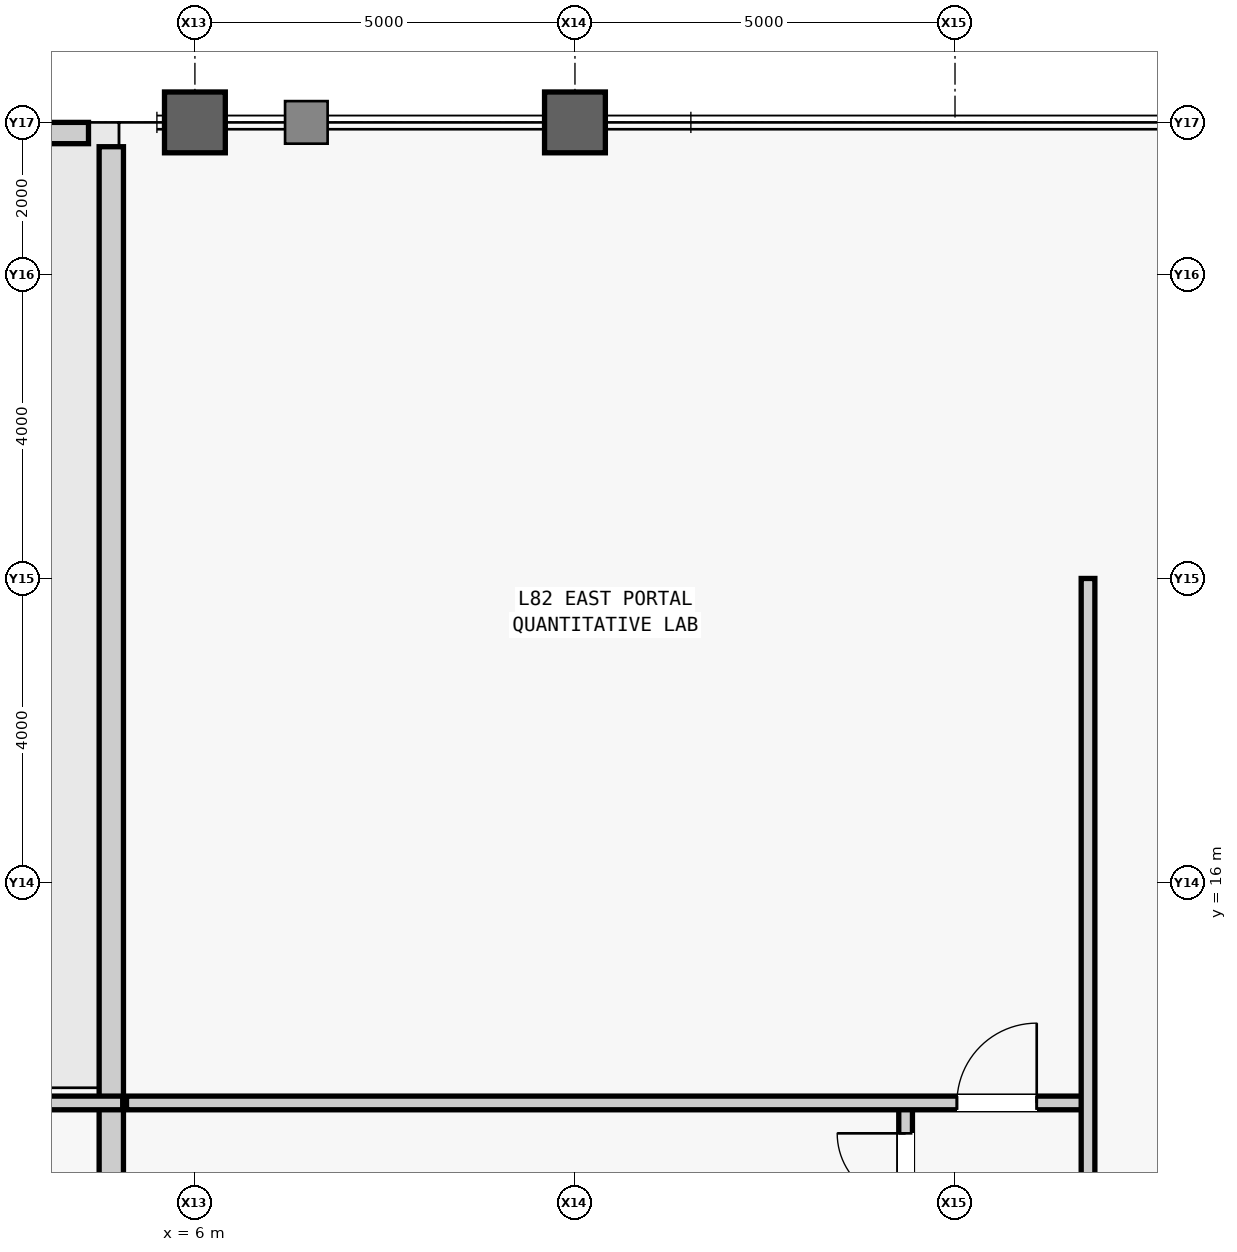
"""IFC4 building model, lengths in metres.
Left out: names, types, materials, properties, quantities, classifications, styles, units other than length and angle.
Written with IfcOpenShell. Run it as: python <this file> out.ifc"""

import sys

from ifc_helpers import new_model, si_unit, direction, frame, frame_2d, origin, origin_2d, place, context, subcontext, project, spatial, rectangle, hollow_rectangle, extrude, source, transform, mapped, element, fill, save


model = new_model("IFC4")
c1 = context("Model", 3, precision=1e-05, world=origin(), true_north=direction((0.0, 1.0)))
c2 = subcontext(c1, "Body", "Model", "MODEL_VIEW")
j1 = project(units=[si_unit("LENGTHUNIT", "METRE"), si_unit("PLANEANGLEUNIT", "RADIAN")], contexts=[c1])
p1 = place(None, origin())
s1 = spatial("IfcSite", under=j1, at=p1, CompositionType="ELEMENT")
p2 = place(p1, origin())
s2 = spatial("IfcBuilding", under=s1, at=p2, CompositionType="ELEMENT")
p3 = place(p2, frame((0.0, 0.0, 346.3)))
s3 = spatial("IfcBuildingStorey", under=s2, at=p3, CompositionType="ELEMENT", Elevation=346.3)
m1 = source(origin(), c2, "Body", "SweptSolid", [
    extrude(hollow_rectangle(XDim=0.8, YDim=0.8, WallThickness=0.045, at=origin_2d()), origin(), (0.0, 0.0, 1.0), 4.0),
])
for number, where, z_axis, x_axis in (
    (1, (6.0, 26.0, 0.0), (0.0, 0.0, 1.0), (1.0, 0.0, 0.0)),
    (2, (11.0, 26.0, 0.0), (0.0, 0.0, 1.0), (1.0, 0.0, 0.0)),
):
    element("IfcColumn", number, at=place(p3, frame(where, z_axis=z_axis, x_axis=x_axis)), inside=s3, PredefinedType="COLUMN", context=c2, shape_type="MappedRepresentation", body=[
        mapped(m1, transform((0.0, 0.0, 0.0), scale=1.0)),
    ])
m2 = source(origin(), c2, "Body", "SweptSolid", [
    extrude(rectangle(XDim=9.2, YDim=0.28, at=frame_2d((4.6, 0.0))), origin(), (0.0, 0.0, 1.0), 1.2),
])
p4 = place(p3, frame((-4.6, 25.86, 0.0), z_axis=(0.0, 0.0, 1.0), x_axis=(1.0, 0.0, 0.0)))
e3 = element("IfcWall", 3, at=p4, inside=s3, PredefinedType="PARAPET", context=c2, shape_type="MappedRepresentation", body=[
    mapped(m2, transform((0.0, 0.0, 0.0), scale=1.0)),
])
m3 = source(origin(), c2, "Body", "SweptSolid", [
    extrude(rectangle(XDim=14.98, YDim=0.32, at=frame_2d((7.49, 0.0))), origin(), (0.0, 0.0, 1.0), 3.045),
])
p5 = place(p3, frame((4.9, 10.7, 0.0), z_axis=(0.0, 0.0, 1.0), x_axis=(0.0, 1.0, 0.0)))
e4 = element("IfcWall", 4, at=p5, inside=s3, PredefinedType="STANDARD", context=c2, shape_type="MappedRepresentation", body=[
    mapped(m3, transform((0.0, 0.0, 0.0), scale=1.0)),
])
m4 = source(origin(), c2, "Body", "SweptSolid", [
    extrude(rectangle(XDim=9.95, YDim=0.18, at=frame_2d((4.975, 0.0))), origin(), (0.0, 0.0, 1.0), 3.74),
])
p6 = place(p3, frame((-4.9, 13.1, 0.0), z_axis=(0.0, 0.0, 1.0), x_axis=(1.0, 0.0, 0.0)))
e5 = element("IfcWall", 5, at=p6, inside=s3, PredefinedType="PARTITIONING", context=c2, shape_type="MappedRepresentation", body=[
    mapped(m4, transform((0.0, 0.0, 0.0), scale=1.0)),
])
m5 = source(origin(), c2, "Body", "SweptSolid", [
    extrude(rectangle(XDim=2.6, YDim=0.18, at=frame_2d((1.3, 0.0))), origin(), (0.0, 0.0, 1.0), 3.74),
])
p7 = place(p3, frame((15.35, 10.5, 0.0), z_axis=(0.0, 0.0, 1.0), x_axis=(0.0, 1.0, 0.0)))
e6 = element("IfcWall", 6, at=p7, inside=s3, PredefinedType="PARTITIONING", context=c2, shape_type="MappedRepresentation", body=[
    mapped(m5, transform((0.0, 0.0, 0.0), scale=1.0)),
])
m6 = source(origin(), c2, "Body", "SweptSolid", [
    extrude(rectangle(XDim=1.8, YDim=2.25, at=frame_2d((0.9, 1.125))), frame((0.0, 0.1, 0.0), z_axis=(0.0, -1.0, 0.0), x_axis=(1.0, 0.0, 0.0)), (0.0, 0.0, 1.0), 0.2),
])
p8 = place(p7, frame((0.4, 0.0, 0.0)))
e7 = element("IfcOpeningElement", 7, at=p8, cuts=e6, PredefinedType="OPENING", context=c2, shape_type="MappedRepresentation", body=[
    mapped(m6, transform((0.0, 0.0, 0.0), scale=1.0)),
])
m7 = source(origin(), c2, "Body", "SweptSolid", [
    extrude(rectangle(XDim=12.65, YDim=0.18, at=frame_2d((6.325, 0.0))), origin(), (0.0, 0.0, 1.0), 3.74),
])
p9 = place(p3, frame((5.1, 13.1, 0.0), z_axis=(0.0, 0.0, 1.0), x_axis=(1.0, 0.0, 0.0)))
e8 = element("IfcWall", 8, at=p9, inside=s3, PredefinedType="PARTITIONING", context=c2, shape_type="MappedRepresentation", body=[
    mapped(m7, transform((0.0, 0.0, 0.0), scale=1.0)),
])
m8 = source(origin(), c2, "Body", "SweptSolid", [
    extrude(rectangle(XDim=1.05, YDim=2.2, at=frame_2d((0.525, 1.1))), frame((0.0, 0.1, 0.0), z_axis=(0.0, -1.0, 0.0), x_axis=(1.0, 0.0, 0.0)), (0.0, 0.0, 1.0), 0.2),
])
p10 = place(p9, frame((10.925, 0.0, 0.0)))
e9 = element("IfcOpeningElement", 9, at=p10, cuts=e8, PredefinedType="OPENING", context=c2, shape_type="MappedRepresentation", body=[
    mapped(m8, transform((0.0, 0.0, 0.0), scale=1.0)),
])
m9 = source(origin(), c2, "Body", "SweptSolid", [
    extrude(rectangle(XDim=40.0, YDim=0.18, at=frame_2d((20.0, 0.0))), origin(), (0.0, 0.0, 1.0), 3.74),
])
p11 = place(p3, frame((17.75, -20.0, 0.0), z_axis=(0.0, 0.0, 1.0), x_axis=(0.0, 1.0, 0.0)))
e10 = element("IfcWall", 10, at=p11, inside=s3, PredefinedType="PARTITIONING", context=c2, shape_type="MappedRepresentation", body=[
    mapped(m9, transform((0.0, 0.0, 0.0), scale=1.0)),
])
m10 = source(origin(), c2, "Body", "SweptSolid", [
    extrude(rectangle(XDim=0.95, YDim=2.15, at=frame_2d((0.475, 1.075))), frame((0.0, 0.1, 0.0), z_axis=(0.0, -1.0, 0.0), x_axis=(1.0, 0.0, 0.0)), (0.0, 0.0, 1.0), 0.2),
])
p12 = place(p11, frame((11.161, 0.0, 0.0)))
e11 = element("IfcOpeningElement", 11, at=p12, cuts=e10, PredefinedType="OPENING", context=c2, shape_type="MappedRepresentation", body=[
    mapped(m10, transform((0.0, 0.0, 0.0), scale=1.0)),
])
p13 = place(p11, frame((16.789, 0.0, 0.0)))
e12 = element("IfcOpeningElement", 12, at=p13, cuts=e10, PredefinedType="OPENING", context=c2, shape_type="MappedRepresentation", body=[
    mapped(m10, transform((0.0, 0.0, 0.0), scale=1.0)),
])
p14 = place(p11, frame((22.945, 0.0, 0.0)))
e13 = element("IfcOpeningElement", 13, at=p14, cuts=e10, PredefinedType="OPENING", context=c2, shape_type="MappedRepresentation", body=[
    mapped(m10, transform((0.0, 0.0, 0.0), scale=1.0)),
])
p15 = place(p11, frame((28.967, 0.0, 0.0)))
e14 = element("IfcOpeningElement", 14, at=p15, cuts=e10, PredefinedType="OPENING", context=c2, shape_type="MappedRepresentation", body=[
    mapped(m10, transform((0.0, 0.0, 0.0), scale=1.0)),
])
m11 = source(origin(), c2, "Body", "SweptSolid", [
    extrude(rectangle(XDim=1.8, YDim=2.25, at=frame_2d((0.9, 1.125))), frame((0.0, 0.025, 0.0), z_axis=(0.0, -1.0, 0.0), x_axis=(1.0, 0.0, 0.0)), (0.0, 0.0, 1.0), 0.05),
])
p16 = place(p8, origin())
e15 = element("IfcDoor", 15, at=p16, inside=s3, OperationType="DOUBLE_DOOR_SINGLE_SWING", PredefinedType="DOOR", context=c2, shape_type="MappedRepresentation", body=[
    mapped(m11, transform((0.0, 0.0, 0.0), scale=1.0)),
])
fill(e7, e15)
m12 = source(origin(), c2, "Body", "SweptSolid", [
    extrude(rectangle(XDim=1.05, YDim=2.2, at=frame_2d((0.525, 1.1))), frame((0.0, 0.025, 0.0), z_axis=(0.0, -1.0, 0.0), x_axis=(1.0, 0.0, 0.0)), (0.0, 0.0, 1.0), 0.05),
])
p17 = place(p10, origin())
e16 = element("IfcDoor", 16, at=p17, inside=s3, OperationType="SINGLE_SWING_RIGHT", PredefinedType="DOOR", context=c2, shape_type="MappedRepresentation", body=[
    mapped(m12, transform((0.0, 0.0, 0.0), scale=1.0)),
])
fill(e9, e16)
save(model, sys.argv[1])
